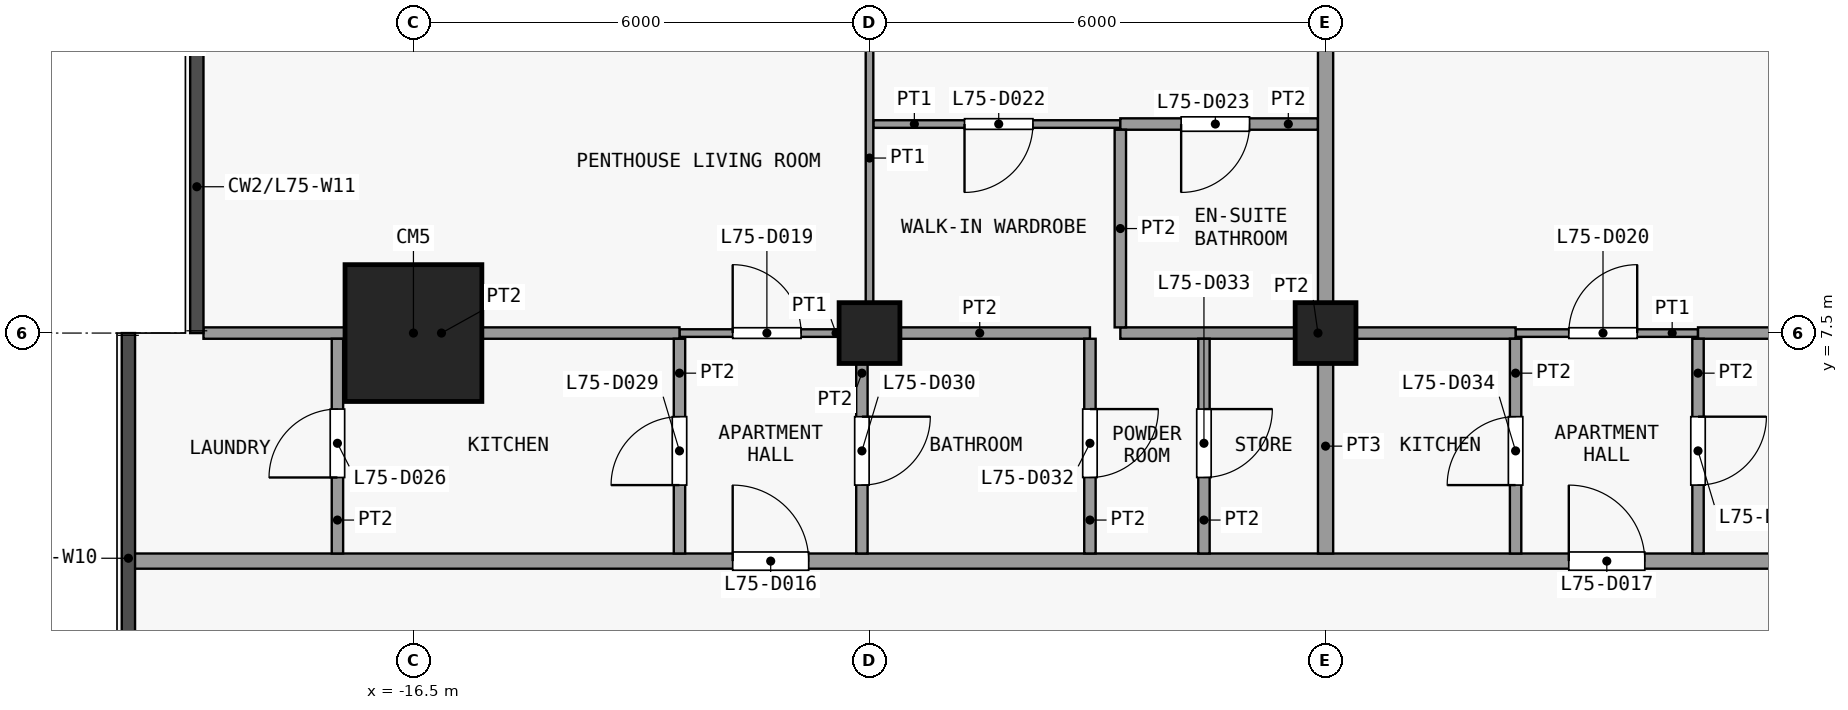
"""IFC4 building model, lengths in metres.
Left out: names, types, materials, properties, quantities, classifications, styles, units other than length and angle.
Written with IfcOpenShell. Run it as: python <this file> out.ifc"""

import sys

from ifc_helpers import new_model, si_unit, direction, frame, frame_2d, origin, origin_2d, place, context, subcontext, project, spatial, rectangle, extrude, element, fill, save


model = new_model("IFC4")
c1 = context("Model", 3, precision=1e-05, world=origin(), true_north=direction((0.0, 1.0)))
c2 = subcontext(c1, "Body", "Model", "MODEL_VIEW")
j1 = project(units=[si_unit("LENGTHUNIT", "METRE"), si_unit("PLANEANGLEUNIT", "RADIAN")], contexts=[c1])
p1 = place(None, origin())
s1 = spatial("IfcSite", under=j1, at=p1, CompositionType="ELEMENT")
p2 = place(p1, origin())
s2 = spatial("IfcBuilding", under=s1, at=p2, CompositionType="ELEMENT")
p3 = place(p2, frame((0.0, 0.0, 295.1)))
s3 = spatial("IfcBuildingStorey", under=s2, at=p3, CompositionType="ELEMENT", Elevation=295.1)
p4 = place(p3, frame((-16.5, 7.5, 0.0), z_axis=(0.0, 0.0, 1.0), x_axis=(1.0, 0.0, 0.0)))
e1 = element("IfcColumn", 1, at=p4, inside=s3, PredefinedType="COLUMN", context=c2, shape_type="SweptSolid", body=[
    extrude(rectangle(XDim=1.8, YDim=1.8, at=origin_2d()), origin(), (0.0, 0.0, 1.0), 3.6),
])
for number, where, z_axis, x_axis in (
    (2, (-10.5, 7.5, 0.0), (0.0, 0.0, 1.0), (1.0, 0.0, 0.0)),
    (3, (-4.5, 7.5, 0.0), (0.0, 0.0, 1.0), (1.0, 0.0, 0.0)),
):
    element("IfcColumn", number, at=place(p3, frame(where, z_axis=z_axis, x_axis=x_axis)), inside=s3, PredefinedType="COLUMN", context=c2, shape_type="SweptSolid", body=[
        extrude(rectangle(XDim=0.8, YDim=0.8, at=origin_2d()), origin(), (0.0, 0.0, 1.0), 3.6),
    ])
p5 = place(p3, frame((-20.25, 4.5, 0.0), z_axis=(0.0, 0.0, 1.0), x_axis=(1.0, 0.0, 0.0)))
e4 = element("IfcWall", 4, at=p5, inside=s3, PredefinedType="PARTITIONING", context=c2, shape_type="SweptSolid", body=[
    extrude(rectangle(XDim=39.6, YDim=0.2, at=frame_2d((19.8, 0.0))), origin(), (0.0, 0.0, 1.0), 3.2),
])
p6 = place(p5, frame((7.95, 0.0, 0.0)))
e5 = element("IfcOpeningElement", 5, at=p6, cuts=e4, PredefinedType="OPENING", context=c2, shape_type="SweptSolid", body=[
    extrude(rectangle(XDim=1.0, YDim=2.1, at=frame_2d((0.5, 1.05))), frame((0.0, 0.11, 0.0), z_axis=(0.0, -1.0, 0.0), x_axis=(1.0, 0.0, 0.0)), (0.0, 0.0, 1.0), 0.22),
])
p7 = place(p5, frame((18.95, 0.0, 0.0)))
e6 = element("IfcOpeningElement", 6, at=p7, cuts=e4, PredefinedType="OPENING", context=c2, shape_type="SweptSolid", body=[
    extrude(rectangle(XDim=1.0, YDim=2.1, at=frame_2d((0.5, 1.05))), frame((0.0, 0.11, 0.0), z_axis=(0.0, -1.0, 0.0), x_axis=(1.0, 0.0, 0.0)), (0.0, 0.0, 1.0), 0.22),
])
p8 = place(p5, frame((33.95, 0.0, 0.0)))
e7 = element("IfcOpeningElement", 7, at=p8, cuts=e4, PredefinedType="OPENING", context=c2, shape_type="SweptSolid", body=[
    extrude(rectangle(XDim=1.0, YDim=2.1, at=frame_2d((0.5, 1.05))), frame((0.0, 0.11, 0.0), z_axis=(0.0, -1.0, 0.0), x_axis=(1.0, 0.0, 0.0)), (0.0, 0.0, 1.0), 0.22),
])
p9 = place(p3, frame((-13.0, 7.5, 0.0), z_axis=(0.0, 0.0, 1.0), x_axis=(1.0, 0.0, 0.0)))
e8 = element("IfcWall", 8, at=p9, inside=s3, PredefinedType="PARTITIONING", context=c2, shape_type="SweptSolid", body=[
    extrude(rectangle(XDim=2.4, YDim=0.1, at=frame_2d((1.2, 0.0))), origin(), (0.0, 0.0, 1.0), 3.2),
])
p10 = place(p9, frame((0.7, 0.0, 0.0)))
e9 = element("IfcOpeningElement", 9, at=p10, cuts=e8, PredefinedType="OPENING", context=c2, shape_type="SweptSolid", body=[
    extrude(rectangle(XDim=0.9, YDim=2.1, at=frame_2d((0.45, 1.05))), frame((0.0, 0.06, 0.0), z_axis=(0.0, -1.0, 0.0), x_axis=(1.0, 0.0, 0.0)), (0.0, 0.0, 1.0), 0.12),
])
p11 = place(p3, frame((-2.0, 7.5, 0.0), z_axis=(0.0, 0.0, 1.0), x_axis=(1.0, 0.0, 0.0)))
e10 = element("IfcWall", 10, at=p11, inside=s3, PredefinedType="PARTITIONING", context=c2, shape_type="SweptSolid", body=[
    extrude(rectangle(XDim=2.4, YDim=0.1, at=frame_2d((1.2, 0.0))), origin(), (0.0, 0.0, 1.0), 3.2),
])
p12 = place(p11, frame((0.7, 0.0, 0.0)))
e11 = element("IfcOpeningElement", 11, at=p12, cuts=e10, PredefinedType="OPENING", context=c2, shape_type="SweptSolid", body=[
    extrude(rectangle(XDim=0.9, YDim=2.1, at=frame_2d((0.45, 1.05))), frame((0.0, 0.06, 0.0), z_axis=(0.0, -1.0, 0.0), x_axis=(1.0, 0.0, 0.0)), (0.0, 0.0, 1.0), 0.12),
])
p13 = place(p3, frame((-19.262, 7.5, 0.0), z_axis=(0.0, 0.0, 1.0), x_axis=(1.0, 0.0, 0.0)))
e12 = element("IfcWall", 12, at=p13, inside=s3, PredefinedType="PARTITIONING", context=c2, shape_type="SweptSolid", body=[
    extrude(rectangle(XDim=6.262, YDim=0.15, at=frame_2d((3.131, 0.0))), origin(), (0.0, 0.0, 1.0), 3.2),
])
p14 = place(p3, frame((-10.5, 7.5, 0.0), z_axis=(0.0, 0.0, 1.0), x_axis=(1.0, 0.0, 0.0)))
e13 = element("IfcWall", 13, at=p14, inside=s3, PredefinedType="PARTITIONING", context=c2, shape_type="SweptSolid", body=[
    extrude(rectangle(XDim=2.9, YDim=0.15, at=frame_2d((1.45, 0.0))), origin(), (0.0, 0.0, 1.0), 3.2),
])
p15 = place(p3, frame((-7.2, 7.5, 0.0), z_axis=(0.0, 0.0, 1.0), x_axis=(1.0, 0.0, 0.0)))
e14 = element("IfcWall", 14, at=p15, inside=s3, PredefinedType="PARTITIONING", context=c2, shape_type="SweptSolid", body=[
    extrude(rectangle(XDim=5.2, YDim=0.15, at=frame_2d((2.6, 0.0))), origin(), (0.0, 0.0, 1.0), 3.2),
])
p16 = place(p3, frame((0.4, 7.5, 0.0), z_axis=(0.0, 0.0, 1.0), x_axis=(1.0, 0.0, 0.0)))
e15 = element("IfcWall", 15, at=p16, inside=s3, PredefinedType="PARTITIONING", context=c2, shape_type="SweptSolid", body=[
    extrude(rectangle(XDim=7.4, YDim=0.15, at=frame_2d((3.7, 0.0))), origin(), (0.0, 0.0, 1.0), 3.2),
])
p17 = place(p3, frame((-10.45, 10.25, 0.0), z_axis=(0.0, 0.0, 1.0), x_axis=(1.0, 0.0, 0.0)))
e16 = element("IfcWall", 16, at=p17, inside=s3, PredefinedType="PARTITIONING", context=c2, shape_type="SweptSolid", body=[
    extrude(rectangle(XDim=3.25, YDim=0.1, at=frame_2d((1.625, 0.0))), origin(), (0.0, 0.0, 1.0), 3.2),
])
p18 = place(p17, frame((1.2, 0.0, 0.0)))
e17 = element("IfcOpeningElement", 17, at=p18, cuts=e16, PredefinedType="OPENING", context=c2, shape_type="SweptSolid", body=[
    extrude(rectangle(XDim=0.9, YDim=2.1, at=frame_2d((0.45, 1.05))), frame((0.0, 0.06, 0.0), z_axis=(0.0, -1.0, 0.0), x_axis=(1.0, 0.0, 0.0)), (0.0, 0.0, 1.0), 0.12),
])
p19 = place(p3, frame((-7.2, 10.25, 0.0), z_axis=(0.0, 0.0, 1.0), x_axis=(1.0, 0.0, 0.0)))
e18 = element("IfcWall", 18, at=p19, inside=s3, PredefinedType="PARTITIONING", context=c2, shape_type="SweptSolid", body=[
    extrude(rectangle(XDim=2.6, YDim=0.15, at=frame_2d((1.3, 0.0))), origin(), (0.0, 0.0, 1.0), 3.2),
])
p20 = place(p19, frame((0.8, 0.0, 0.0)))
e19 = element("IfcOpeningElement", 19, at=p20, cuts=e18, PredefinedType="OPENING", context=c2, shape_type="SweptSolid", body=[
    extrude(rectangle(XDim=0.9, YDim=2.1, at=frame_2d((0.45, 1.05))), frame((0.0, 0.085, 0.0), z_axis=(0.0, -1.0, 0.0), x_axis=(1.0, 0.0, 0.0)), (0.0, 0.0, 1.0), 0.17),
])
p21 = place(p3, frame((-17.5, 4.6, 0.0), z_axis=(0.0, 0.0, 1.0), x_axis=(0.0, 1.0, 0.0)))
e20 = element("IfcWall", 20, at=p21, inside=s3, PredefinedType="PARTITIONING", context=c2, shape_type="SweptSolid", body=[
    extrude(rectangle(XDim=2.825, YDim=0.15, at=frame_2d((1.413, 0.0))), origin(), (0.0, 0.0, 1.0), 3.2),
])
p22 = place(p21, frame((1.0, 0.0, 0.0)))
e21 = element("IfcOpeningElement", 21, at=p22, cuts=e20, PredefinedType="OPENING", context=c2, shape_type="SweptSolid", body=[
    extrude(rectangle(XDim=0.9, YDim=2.1, at=frame_2d((0.45, 1.05))), frame((0.0, 0.085, 0.0), z_axis=(0.0, -1.0, 0.0), x_axis=(1.0, 0.0, 0.0)), (0.0, 0.0, 1.0), 0.17),
])
p23 = place(p3, frame((-13.0, 4.6, 0.0), z_axis=(0.0, 0.0, 1.0), x_axis=(0.0, 1.0, 0.0)))
e22 = element("IfcWall", 22, at=p23, inside=s3, PredefinedType="PARTITIONING", context=c2, shape_type="SweptSolid", body=[
    extrude(rectangle(XDim=2.825, YDim=0.15, at=frame_2d((1.413, 0.0))), origin(), (0.0, 0.0, 1.0), 3.2),
])
p24 = place(p23, frame((0.9, 0.0, 0.0)))
e23 = element("IfcOpeningElement", 23, at=p24, cuts=e22, PredefinedType="OPENING", context=c2, shape_type="SweptSolid", body=[
    extrude(rectangle(XDim=0.9, YDim=2.1, at=frame_2d((0.45, 1.05))), frame((0.0, 0.085, 0.0), z_axis=(0.0, -1.0, 0.0), x_axis=(1.0, 0.0, 0.0)), (0.0, 0.0, 1.0), 0.17),
])
p25 = place(p3, frame((-10.6, 4.6, 0.0), z_axis=(0.0, 0.0, 1.0), x_axis=(0.0, 1.0, 0.0)))
e24 = element("IfcWall", 24, at=p25, inside=s3, PredefinedType="PARTITIONING", context=c2, shape_type="SweptSolid", body=[
    extrude(rectangle(XDim=2.825, YDim=0.15, at=frame_2d((1.413, 0.0))), origin(), (0.0, 0.0, 1.0), 3.2),
])
p26 = place(p25, frame((0.9, 0.0, 0.0)))
e25 = element("IfcOpeningElement", 25, at=p26, cuts=e24, PredefinedType="OPENING", context=c2, shape_type="SweptSolid", body=[
    extrude(rectangle(XDim=0.9, YDim=2.1, at=frame_2d((0.45, 1.05))), frame((0.0, 0.085, 0.0), z_axis=(0.0, -1.0, 0.0), x_axis=(1.0, 0.0, 0.0)), (0.0, 0.0, 1.0), 0.17),
])
p27 = place(p3, frame((-10.5, 7.575, 0.0), z_axis=(0.0, 0.0, 1.0), x_axis=(0.0, 1.0, 0.0)))
e26 = element("IfcWall", 26, at=p27, inside=s3, PredefinedType="PARTITIONING", context=c2, shape_type="SweptSolid", body=[
    extrude(rectangle(XDim=8.688, YDim=0.1, at=frame_2d((4.344, 0.0))), origin(), (0.0, 0.0, 1.0), 3.2),
])
p28 = place(p27, frame((4.575, 0.0, 0.0)))
e27 = element("IfcOpeningElement", 27, at=p28, cuts=e26, PredefinedType="OPENING", context=c2, shape_type="SweptSolid", body=[
    extrude(rectangle(XDim=0.9, YDim=2.1, at=frame_2d((0.45, 1.05))), frame((0.0, 0.06, 0.0), z_axis=(0.0, -1.0, 0.0), x_axis=(1.0, 0.0, 0.0)), (0.0, 0.0, 1.0), 0.12),
])
p29 = place(p3, frame((-7.6, 4.6, 0.0), z_axis=(0.0, 0.0, 1.0), x_axis=(0.0, 1.0, 0.0)))
e28 = element("IfcWall", 28, at=p29, inside=s3, PredefinedType="PARTITIONING", context=c2, shape_type="SweptSolid", body=[
    extrude(rectangle(XDim=2.825, YDim=0.15, at=frame_2d((1.413, 0.0))), origin(), (0.0, 0.0, 1.0), 3.2),
])
p30 = place(p29, frame((1.0, 0.0, 0.0)))
e29 = element("IfcOpeningElement", 29, at=p30, cuts=e28, PredefinedType="OPENING", context=c2, shape_type="SweptSolid", body=[
    extrude(rectangle(XDim=0.9, YDim=2.1, at=frame_2d((0.45, 1.05))), frame((0.0, 0.085, 0.0), z_axis=(0.0, -1.0, 0.0), x_axis=(1.0, 0.0, 0.0)), (0.0, 0.0, 1.0), 0.17),
])
p31 = place(p3, frame((-7.2, 7.575, 0.0), z_axis=(0.0, 0.0, 1.0), x_axis=(0.0, 1.0, 0.0)))
e30 = element("IfcWall", 30, at=p31, inside=s3, PredefinedType="PARTITIONING", context=c2, shape_type="SweptSolid", body=[
    extrude(rectangle(XDim=2.6, YDim=0.15, at=frame_2d((1.3, 0.0))), origin(), (0.0, 0.0, 1.0), 3.2),
])
p32 = place(p3, frame((-6.1, 4.6, 0.0), z_axis=(0.0, 0.0, 1.0), x_axis=(0.0, 1.0, 0.0)))
e31 = element("IfcWall", 31, at=p32, inside=s3, PredefinedType="PARTITIONING", context=c2, shape_type="SweptSolid", body=[
    extrude(rectangle(XDim=2.825, YDim=0.15, at=frame_2d((1.413, 0.0))), origin(), (0.0, 0.0, 1.0), 3.2),
])
p33 = place(p32, frame((1.0, 0.0, 0.0)))
e32 = element("IfcOpeningElement", 32, at=p33, cuts=e31, PredefinedType="OPENING", context=c2, shape_type="SweptSolid", body=[
    extrude(rectangle(XDim=0.9, YDim=2.1, at=frame_2d((0.45, 1.05))), frame((0.0, 0.085, 0.0), z_axis=(0.0, -1.0, 0.0), x_axis=(1.0, 0.0, 0.0)), (0.0, 0.0, 1.0), 0.17),
])
p34 = place(p3, frame((-4.5, 4.6, 0.0), z_axis=(0.0, 0.0, 1.0), x_axis=(0.0, 1.0, 0.0)))
e33 = element("IfcWall", 33, at=p34, inside=s3, PredefinedType="PARTITIONING", context=c2, shape_type="SweptSolid", body=[
    extrude(rectangle(XDim=2.825, YDim=0.2, at=frame_2d((1.413, 0.0))), origin(), (0.0, 0.0, 1.0), 3.2),
])
p35 = place(p3, frame((-4.5, 7.575, 0.0), z_axis=(0.0, 0.0, 1.0), x_axis=(0.0, 1.0, 0.0)))
e34 = element("IfcWall", 34, at=p35, inside=s3, PredefinedType="PARTITIONING", context=c2, shape_type="SweptSolid", body=[
    extrude(rectangle(XDim=8.688, YDim=0.2, at=frame_2d((4.344, 0.0))), origin(), (0.0, 0.0, 1.0), 3.2),
])
p36 = place(p3, frame((-2.0, 4.6, 0.0), z_axis=(0.0, 0.0, 1.0), x_axis=(0.0, 1.0, 0.0)))
e35 = element("IfcWall", 35, at=p36, inside=s3, PredefinedType="PARTITIONING", context=c2, shape_type="SweptSolid", body=[
    extrude(rectangle(XDim=2.825, YDim=0.15, at=frame_2d((1.413, 0.0))), origin(), (0.0, 0.0, 1.0), 3.2),
])
p37 = place(p36, frame((0.9, 0.0, 0.0)))
e36 = element("IfcOpeningElement", 36, at=p37, cuts=e35, PredefinedType="OPENING", context=c2, shape_type="SweptSolid", body=[
    extrude(rectangle(XDim=0.9, YDim=2.1, at=frame_2d((0.45, 1.05))), frame((0.0, 0.085, 0.0), z_axis=(0.0, -1.0, 0.0), x_axis=(1.0, 0.0, 0.0)), (0.0, 0.0, 1.0), 0.17),
])
p38 = place(p3, frame((0.4, 4.6, 0.0), z_axis=(0.0, 0.0, 1.0), x_axis=(0.0, 1.0, 0.0)))
e37 = element("IfcWall", 37, at=p38, inside=s3, PredefinedType="PARTITIONING", context=c2, shape_type="SweptSolid", body=[
    extrude(rectangle(XDim=2.825, YDim=0.15, at=frame_2d((1.413, 0.0))), origin(), (0.0, 0.0, 1.0), 3.2),
])
p39 = place(p38, frame((0.9, 0.0, 0.0)))
e38 = element("IfcOpeningElement", 38, at=p39, cuts=e37, PredefinedType="OPENING", context=c2, shape_type="SweptSolid", body=[
    extrude(rectangle(XDim=0.9, YDim=2.1, at=frame_2d((0.45, 1.05))), frame((0.0, 0.085, 0.0), z_axis=(0.0, -1.0, 0.0), x_axis=(1.0, 0.0, 0.0)), (0.0, 0.0, 1.0), 0.17),
])
p40 = place(p6, origin())
e39 = element("IfcDoor", 39, at=p40, inside=s3, OperationType="SINGLE_SWING_RIGHT", PredefinedType="DOOR", context=c2, shape_type="SweptSolid", body=[
    extrude(rectangle(XDim=1.0, YDim=2.1, at=frame_2d((0.5, 1.05))), frame((0.0, 0.025, 0.0), z_axis=(0.0, -1.0, 0.0), x_axis=(1.0, 0.0, 0.0)), (0.0, 0.0, 1.0), 0.05),
])
fill(e5, e39)
p41 = place(p7, origin())
e40 = element("IfcDoor", 40, at=p41, inside=s3, OperationType="SINGLE_SWING_RIGHT", PredefinedType="DOOR", context=c2, shape_type="SweptSolid", body=[
    extrude(rectangle(XDim=1.0, YDim=2.1, at=frame_2d((0.5, 1.05))), frame((0.0, 0.025, 0.0), z_axis=(0.0, -1.0, 0.0), x_axis=(1.0, 0.0, 0.0)), (0.0, 0.0, 1.0), 0.05),
])
fill(e6, e40)
p42 = place(p10, origin())
e41 = element("IfcDoor", 41, at=p42, inside=s3, OperationType="SINGLE_SWING_RIGHT", PredefinedType="DOOR", context=c2, shape_type="SweptSolid", body=[
    extrude(rectangle(XDim=0.9, YDim=2.1, at=frame_2d((0.45, 1.05))), frame((0.0, 0.025, 0.0), z_axis=(0.0, -1.0, 0.0), x_axis=(1.0, 0.0, 0.0)), (0.0, 0.0, 1.0), 0.05),
])
fill(e9, e41)
p43 = place(p12, origin())
e42 = element("IfcDoor", 42, at=p43, inside=s3, OperationType="SINGLE_SWING_LEFT", PredefinedType="DOOR", context=c2, shape_type="SweptSolid", body=[
    extrude(rectangle(XDim=0.9, YDim=2.1, at=frame_2d((0.45, 1.05))), frame((0.0, 0.025, 0.0), z_axis=(0.0, -1.0, 0.0), x_axis=(1.0, 0.0, 0.0)), (0.0, 0.0, 1.0), 0.05),
])
fill(e11, e42)
p44 = place(p18, origin())
e43 = element("IfcDoor", 43, at=p44, inside=s3, OperationType="SINGLE_SWING_LEFT", PredefinedType="DOOR", context=c2, shape_type="SweptSolid", body=[
    extrude(rectangle(XDim=0.9, YDim=2.1, at=frame_2d((0.45, 1.05))), frame((0.0, 0.025, 0.0), z_axis=(0.0, -1.0, 0.0), x_axis=(1.0, 0.0, 0.0)), (0.0, 0.0, 1.0), 0.05),
])
fill(e17, e43)
p45 = place(p20, origin())
e44 = element("IfcDoor", 44, at=p45, inside=s3, OperationType="SINGLE_SWING_LEFT", PredefinedType="DOOR", context=c2, shape_type="SweptSolid", body=[
    extrude(rectangle(XDim=0.9, YDim=2.1, at=frame_2d((0.45, 1.05))), frame((0.0, 0.025, 0.0), z_axis=(0.0, -1.0, 0.0), x_axis=(1.0, 0.0, 0.0)), (0.0, 0.0, 1.0), 0.05),
])
fill(e19, e44)
p46 = place(p22, origin())
e45 = element("IfcDoor", 45, at=p46, inside=s3, OperationType="SINGLE_SWING_RIGHT", PredefinedType="DOOR", context=c2, shape_type="SweptSolid", body=[
    extrude(rectangle(XDim=0.9, YDim=2.1, at=frame_2d((0.45, 1.05))), frame((0.0, 0.025, 0.0), z_axis=(0.0, -1.0, 0.0), x_axis=(1.0, 0.0, 0.0)), (0.0, 0.0, 1.0), 0.05),
])
fill(e21, e45)
p47 = place(p24, origin())
e46 = element("IfcDoor", 46, at=p47, inside=s3, OperationType="SINGLE_SWING_RIGHT", PredefinedType="DOOR", context=c2, shape_type="SweptSolid", body=[
    extrude(rectangle(XDim=0.9, YDim=2.1, at=frame_2d((0.45, 1.05))), frame((0.0, 0.025, 0.0), z_axis=(0.0, -1.0, 0.0), x_axis=(1.0, 0.0, 0.0)), (0.0, 0.0, 1.0), 0.05),
])
fill(e23, e46)
p48 = place(p26, origin())
e47 = element("IfcDoor", 47, at=p48, inside=s3, OperationType="SINGLE_SWING_RIGHT", PredefinedType="DOOR", context=c2, shape_type="SweptSolid", body=[
    extrude(rectangle(XDim=0.9, YDim=2.1, at=frame_2d((0.45, 1.05))), frame((0.0, 0.025, 0.0), z_axis=(0.0, -1.0, 0.0), x_axis=(1.0, 0.0, 0.0)), (0.0, 0.0, 1.0), 0.05),
])
fill(e25, e47)
p49 = place(p30, origin())
e48 = element("IfcDoor", 48, at=p49, inside=s3, OperationType="SINGLE_SWING_RIGHT", PredefinedType="DOOR", context=c2, shape_type="SweptSolid", body=[
    extrude(rectangle(XDim=0.9, YDim=2.1, at=frame_2d((0.45, 1.05))), frame((0.0, 0.025, 0.0), z_axis=(0.0, -1.0, 0.0), x_axis=(1.0, 0.0, 0.0)), (0.0, 0.0, 1.0), 0.05),
])
fill(e29, e48)
p50 = place(p33, origin())
e49 = element("IfcDoor", 49, at=p50, inside=s3, OperationType="SINGLE_SWING_RIGHT", PredefinedType="DOOR", context=c2, shape_type="SweptSolid", body=[
    extrude(rectangle(XDim=0.9, YDim=2.1, at=frame_2d((0.45, 1.05))), frame((0.0, 0.025, 0.0), z_axis=(0.0, -1.0, 0.0), x_axis=(1.0, 0.0, 0.0)), (0.0, 0.0, 1.0), 0.05),
])
fill(e32, e49)
p51 = place(p37, origin())
e50 = element("IfcDoor", 50, at=p51, inside=s3, OperationType="SINGLE_SWING_RIGHT", PredefinedType="DOOR", context=c2, shape_type="SweptSolid", body=[
    extrude(rectangle(XDim=0.9, YDim=2.1, at=frame_2d((0.45, 1.05))), frame((0.0, 0.025, 0.0), z_axis=(0.0, -1.0, 0.0), x_axis=(1.0, 0.0, 0.0)), (0.0, 0.0, 1.0), 0.05),
])
fill(e36, e50)
p52 = place(p39, origin())
e51 = element("IfcDoor", 51, at=p52, inside=s3, OperationType="SINGLE_SWING_RIGHT", PredefinedType="DOOR", context=c2, shape_type="SweptSolid", body=[
    extrude(rectangle(XDim=0.9, YDim=2.1, at=frame_2d((0.45, 1.05))), frame((0.0, 0.025, 0.0), z_axis=(0.0, -1.0, 0.0), x_axis=(1.0, 0.0, 0.0)), (0.0, 0.0, 1.0), 0.05),
])
fill(e38, e51)
save(model, sys.argv[1])
